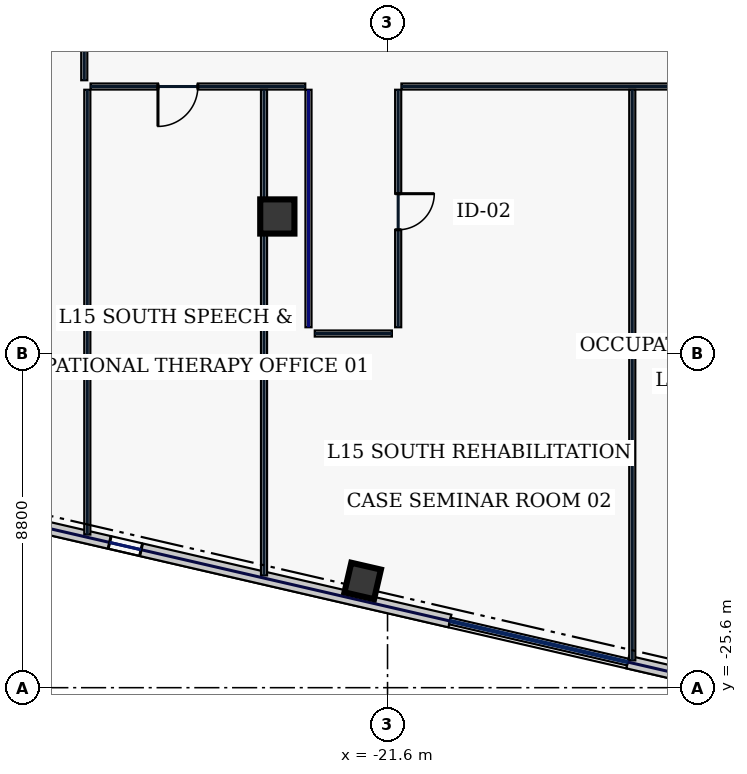
"""IFC4 building model, lengths in metres.
Left out: names, types, materials, properties, quantities, classifications, styles, units other than length and angle.
Written with IfcOpenShell. Run it as: python <this file> out.ifc"""

import sys

from ifc_helpers import new_model, si_unit, direction, frame, frame_2d, origin, origin_2d, place, context, subcontext, project, spatial, rectangle, hollow_rectangle, extrude, element, fill, save


model = new_model("IFC4")
c1 = context("Model", 3, precision=1e-05, world=origin(), true_north=direction((0.0, 1.0)))
c2 = subcontext(c1, "Body", "Model", "MODEL_VIEW")
j1 = project(units=[si_unit("LENGTHUNIT", "METRE"), si_unit("PLANEANGLEUNIT", "RADIAN")], contexts=[c1])
p1 = place(None, origin())
s1 = spatial("IfcSite", under=j1, at=p1, CompositionType="ELEMENT")
p2 = place(p1, origin())
s2 = spatial("IfcBuilding", under=s1, at=p2, CompositionType="ELEMENT")
p3 = place(p2, frame((0.0, 0.0, 71.4)))
s3 = spatial("IfcBuildingStorey", under=s2, at=p3, CompositionType="ELEMENT", Elevation=71.4)
p4 = place(p3, frame((-24.5, -13.2, 0.0), z_axis=(0.0, 0.0, 1.0), x_axis=(1.0, 0.0, 0.0)))
e1 = element("IfcColumn", 1, at=p4, inside=s3, PredefinedType="COLUMN", context=c2, shape_type="SweptSolid", body=[
    extrude(hollow_rectangle(XDim=0.9, YDim=0.9, WallThickness=0.04, at=origin_2d()), origin(), (0.0, 0.0, 1.0), 3.74),
])
p5 = place(p3, frame((-22.254, -22.792, 0.0), z_axis=(0.0, 0.0, 1.0), x_axis=(0.974370064785, -0.224951054344, 0.0)))
e2 = element("IfcColumn", 2, at=p5, inside=s3, PredefinedType="COLUMN", context=c2, shape_type="SweptSolid", body=[
    extrude(hollow_rectangle(XDim=0.8, YDim=0.8, WallThickness=0.036, at=origin_2d()), origin(), (0.0, 0.0, 1.0), 3.74),
])
p6 = place(p3, frame((-42.029, -18.75, 0.0), z_axis=(0.0, 0.0, 1.0), x_axis=(0.97436993772, -0.224951604723, 0.0)))
e3 = element("IfcWall", 3, at=p6, inside=s3, PredefinedType="STANDARD", context=c2, shape_type="SweptSolid", body=[
    extrude(rectangle(XDim=22.651, YDim=0.34, at=frame_2d((11.326, 0.0))), origin(), (0.0, 0.0, 1.0), 3.74),
])
p7 = place(p6, frame((2.062, 0.0, 0.72)))
e4 = element("IfcOpeningElement", 4, at=p7, cuts=e3, PredefinedType="OPENING", context=c2, shape_type="SweptSolid", body=[
    extrude(rectangle(XDim=2.5, YDim=2.15, at=frame_2d((1.25, 1.075))), frame((0.0, 0.18, 0.0), z_axis=(0.0, -1.0, 0.0), x_axis=(1.0, 0.0, 0.0)), (0.0, 0.0, 1.0), 0.36),
])
p8 = place(p6, frame((6.546, 0.0, 0.72)))
e5 = element("IfcOpeningElement", 5, at=p8, cuts=e3, PredefinedType="OPENING", context=c2, shape_type="SweptSolid", body=[
    extrude(rectangle(XDim=2.5, YDim=2.15, at=frame_2d((1.25, 1.075))), frame((0.0, 0.18, 0.0), z_axis=(0.0, -1.0, 0.0), x_axis=(1.0, 0.0, 0.0)), (0.0, 0.0, 1.0), 0.36),
])
p9 = place(p6, frame((13.461, 0.0, 0.72)))
e6 = element("IfcOpeningElement", 6, at=p9, cuts=e3, PredefinedType="OPENING", context=c2, shape_type="SweptSolid", body=[
    extrude(rectangle(XDim=0.85, YDim=1.85, at=frame_2d((0.425, 0.925))), frame((0.0, 0.18, 0.0), z_axis=(0.0, -1.0, 0.0), x_axis=(1.0, 0.0, 0.0)), (0.0, 0.0, 1.0), 0.36),
])
p10 = place(p3, frame((-15.281, -24.925, 0.0), z_axis=(0.0, 0.0, 1.0), x_axis=(0.974370193991, -0.22495049469, 0.0)))
e7 = element("IfcWall", 7, at=p10, inside=s3, PredefinedType="STANDARD", context=c2, shape_type="SweptSolid", body=[
    extrude(rectangle(XDim=14.697, YDim=0.34, at=frame_2d((7.349, 0.0))), origin(), (0.0, 0.0, 1.0), 3.74),
])
p11 = place(p10, frame((3.856, 0.0, 0.72)))
e8 = element("IfcOpeningElement", 8, at=p11, cuts=e7, PredefinedType="OPENING", context=c2, shape_type="SweptSolid", body=[
    extrude(rectangle(XDim=2.5, YDim=2.15, at=frame_2d((1.25, 1.075))), frame((0.0, 0.18, 0.0), z_axis=(0.0, -1.0, 0.0), x_axis=(1.0, 0.0, 0.0)), (0.0, 0.0, 1.0), 0.36),
])
p12 = place(p10, frame((8.341, 0.0, 0.72)))
e9 = element("IfcOpeningElement", 9, at=p12, cuts=e7, PredefinedType="OPENING", context=c2, shape_type="SweptSolid", body=[
    extrude(rectangle(XDim=2.5, YDim=2.15, at=frame_2d((1.25, 1.075))), frame((0.0, 0.18, 0.0), z_axis=(0.0, -1.0, 0.0), x_axis=(1.0, 0.0, 0.0)), (0.0, 0.0, 1.0), 0.36),
])
p13 = place(p3, frame((-23.765, -9.78, 0.0), z_axis=(0.0, 0.0, 1.0), x_axis=(-1.0, 0.0, 0.0)))
e10 = element("IfcWall", 10, at=p13, inside=s3, PredefinedType="PARTITIONING", context=c2, shape_type="SweptSolid", body=[
    extrude(rectangle(XDim=5.65, YDim=0.16, at=frame_2d((2.825, 0.0))), origin(), (0.0, 0.0, 1.0), 3.74),
])
p14 = place(p13, frame((2.826, 0.0, 0.0)))
e11 = element("IfcOpeningElement", 11, at=p14, cuts=e10, PredefinedType="OPENING", context=c2, shape_type="SweptSolid", body=[
    extrude(rectangle(XDim=1.05, YDim=2.2, at=frame_2d((0.525, 1.1))), frame((0.0, 0.09, 0.0), z_axis=(0.0, -1.0, 0.0), x_axis=(1.0, 0.0, 0.0)), (0.0, 0.0, 1.0), 0.18),
])
p15 = place(p3, frame((-29.58, -9.615, 0.0), z_axis=(0.0, 0.0, 1.0), x_axis=(0.0, 1.0, 0.0)))
e12 = element("IfcWall", 12, at=p15, inside=s3, PredefinedType="PARTITIONING", context=c2, shape_type="SweptSolid", body=[
    extrude(rectangle(XDim=19.28, YDim=0.16, at=frame_2d((9.64, 0.0))), origin(), (0.0, 0.0, 1.0), 3.74),
])
p16 = place(p15, frame((1.969, 0.0, 0.0)))
e13 = element("IfcOpeningElement", 13, at=p16, cuts=e12, PredefinedType="OPENING", context=c2, shape_type="SweptSolid", body=[
    extrude(rectangle(XDim=0.95, YDim=2.2, at=frame_2d((0.475, 1.1))), frame((0.0, 0.09, 0.0), z_axis=(0.0, -1.0, 0.0), x_axis=(1.0, 0.0, 0.0)), (0.0, 0.0, 1.0), 0.18),
])
p17 = place(p15, frame((7.25, 0.0, 0.0)))
e14 = element("IfcOpeningElement", 14, at=p17, cuts=e12, PredefinedType="OPENING", context=c2, shape_type="SweptSolid", body=[
    extrude(rectangle(XDim=0.95, YDim=2.2, at=frame_2d((0.475, 1.1))), frame((0.0, 0.09, 0.0), z_axis=(0.0, -1.0, 0.0), x_axis=(1.0, 0.0, 0.0)), (0.0, 0.0, 1.0), 0.18),
])
p18 = place(p15, frame((12.45, 0.0, 0.0)))
e15 = element("IfcOpeningElement", 15, at=p18, cuts=e12, PredefinedType="OPENING", context=c2, shape_type="SweptSolid", body=[
    extrude(rectangle(XDim=0.95, YDim=2.2, at=frame_2d((0.475, 1.1))), frame((0.0, 0.09, 0.0), z_axis=(0.0, -1.0, 0.0), x_axis=(1.0, 0.0, 0.0)), (0.0, 0.0, 1.0), 0.18),
])
p19 = place(p15, frame((16.506, 0.0, 0.0)))
e16 = element("IfcOpeningElement", 16, at=p19, cuts=e12, PredefinedType="OPENING", context=c2, shape_type="SweptSolid", body=[
    extrude(rectangle(XDim=0.95, YDim=2.2, at=frame_2d((0.475, 1.1))), frame((0.0, 0.09, 0.0), z_axis=(0.0, -1.0, 0.0), x_axis=(1.0, 0.0, 0.0)), (0.0, 0.0, 1.0), 0.18),
])
p20 = place(p3, frame((29.415, -9.78, 0.0), z_axis=(0.0, 0.0, 1.0), x_axis=(-1.0, 0.0, 0.0)))
e17 = element("IfcWall", 17, at=p20, inside=s3, PredefinedType="PARTITIONING", context=c2, shape_type="SweptSolid", body=[
    extrude(rectangle(XDim=50.65, YDim=0.16, at=frame_2d((25.325, 0.0))), origin(), (0.0, 0.0, 1.0), 3.74),
])
p21 = place(p20, frame((40.5, 0.0, 0.0)))
e18 = element("IfcOpeningElement", 18, at=p21, cuts=e17, PredefinedType="OPENING", context=c2, shape_type="SweptSolid", body=[
    extrude(rectangle(XDim=0.95, YDim=2.2, at=frame_2d((0.475, 1.1))), frame((0.0, 0.09, 0.0), z_axis=(0.0, -1.0, 0.0), x_axis=(1.0, 0.0, 0.0)), (0.0, 0.0, 1.0), 0.18),
])
p22 = place(p20, frame((33.52, 0.0, 0.0)))
e19 = element("IfcOpeningElement", 19, at=p22, cuts=e17, PredefinedType="OPENING", context=c2, shape_type="SweptSolid", body=[
    extrude(rectangle(XDim=0.95, YDim=2.2, at=frame_2d((0.475, 1.1))), frame((0.0, 0.09, 0.0), z_axis=(0.0, -1.0, 0.0), x_axis=(1.0, 0.0, 0.0)), (0.0, 0.0, 1.0), 0.18),
])
p23 = place(p20, frame((26.525, 0.0, 0.0)))
e20 = element("IfcOpeningElement", 20, at=p23, cuts=e17, PredefinedType="OPENING", context=c2, shape_type="SweptSolid", body=[
    extrude(rectangle(XDim=0.95, YDim=2.2, at=frame_2d((0.475, 1.1))), frame((0.0, 0.09, 0.0), z_axis=(0.0, -1.0, 0.0), x_axis=(1.0, 0.0, 0.0)), (0.0, 0.0, 1.0), 0.18),
])
p24 = place(p20, frame((20.75, 0.0, 0.0)))
e21 = element("IfcOpeningElement", 21, at=p24, cuts=e17, PredefinedType="OPENING", context=c2, shape_type="SweptSolid", body=[
    extrude(rectangle(XDim=1.05, YDim=2.2, at=frame_2d((0.525, 1.1))), frame((0.0, 0.09, 0.0), z_axis=(0.0, -1.0, 0.0), x_axis=(1.0, 0.0, 0.0)), (0.0, 0.0, 1.0), 0.18),
])
p25 = place(p20, frame((17.05, 0.0, 0.0)))
e22 = element("IfcOpeningElement", 22, at=p25, cuts=e17, PredefinedType="OPENING", context=c2, shape_type="SweptSolid", body=[
    extrude(rectangle(XDim=0.95, YDim=2.2, at=frame_2d((0.475, 1.1))), frame((0.0, 0.09, 0.0), z_axis=(0.0, -1.0, 0.0), x_axis=(1.0, 0.0, 0.0)), (0.0, 0.0, 1.0), 0.18),
])
p26 = place(p20, frame((13.35, 0.0, 0.0)))
e23 = element("IfcOpeningElement", 23, at=p26, cuts=e17, PredefinedType="OPENING", context=c2, shape_type="SweptSolid", body=[
    extrude(rectangle(XDim=1.15, YDim=2.2, at=frame_2d((0.575, 1.1))), frame((0.0, 0.09, 0.0), z_axis=(0.0, -1.0, 0.0), x_axis=(1.0, 0.0, 0.0)), (0.0, 0.0, 1.0), 0.18),
])
p27 = place(p20, frame((9.65, 0.0, 0.0)))
e24 = element("IfcOpeningElement", 24, at=p27, cuts=e17, PredefinedType="OPENING", context=c2, shape_type="SweptSolid", body=[
    extrude(rectangle(XDim=0.95, YDim=2.2, at=frame_2d((0.475, 1.1))), frame((0.0, 0.09, 0.0), z_axis=(0.0, -1.0, 0.0), x_axis=(1.0, 0.0, 0.0)), (0.0, 0.0, 1.0), 0.18),
])
p28 = place(p20, frame((6.1, 0.0, 0.0)))
e25 = element("IfcOpeningElement", 25, at=p28, cuts=e17, PredefinedType="OPENING", context=c2, shape_type="SweptSolid", body=[
    extrude(rectangle(XDim=0.95, YDim=2.2, at=frame_2d((0.475, 1.1))), frame((0.0, 0.09, 0.0), z_axis=(0.0, -1.0, 0.0), x_axis=(1.0, 0.0, 0.0)), (0.0, 0.0, 1.0), 0.18),
])
p29 = place(p20, frame((2.044, 0.0, 0.0)))
e26 = element("IfcOpeningElement", 26, at=p29, cuts=e17, PredefinedType="OPENING", context=c2, shape_type="SweptSolid", body=[
    extrude(rectangle(XDim=1.05, YDim=2.2, at=frame_2d((0.525, 1.1))), frame((0.0, 0.09, 0.0), z_axis=(0.0, -1.0, 0.0), x_axis=(1.0, 0.0, 0.0)), (0.0, 0.0, 1.0), 0.18),
])
p30 = place(p3, frame((-21.32, -9.865, 0.0), z_axis=(0.0, 0.0, 1.0), x_axis=(0.0, -1.0, 0.0)))
e27 = element("IfcWall", 27, at=p30, inside=s3, PredefinedType="PARTITIONING", context=c2, shape_type="SweptSolid", body=[
    extrude(rectangle(XDim=6.25, YDim=0.16, at=frame_2d((3.125, 0.0))), origin(), (0.0, 0.0, 1.0), 3.74),
])
p31 = place(p30, frame((2.735, 0.0, 0.0)))
e28 = element("IfcOpeningElement", 28, at=p31, cuts=e27, PredefinedType="OPENING", context=c2, shape_type="SweptSolid", body=[
    extrude(rectangle(XDim=0.95, YDim=2.2, at=frame_2d((0.475, 1.1))), frame((0.0, 0.09, 0.0), z_axis=(0.0, -1.0, 0.0), x_axis=(1.0, 0.0, 0.0)), (0.0, 0.0, 1.0), 0.18),
])
p32 = place(p3, frame((-21.485, -16.28, 0.0), z_axis=(0.0, 0.0, 1.0), x_axis=(-1.0, 0.0, 0.0)))
e29 = element("IfcWall", 29, at=p32, inside=s3, PredefinedType="PARTITIONING", context=c2, shape_type="SweptSolid", body=[
    extrude(rectangle(XDim=2.03, YDim=0.16, at=frame_2d((1.015, 0.0))), origin(), (0.0, 0.0, 1.0), 3.74),
])
p33 = place(p3, frame((-23.68, -16.115, 0.0), z_axis=(0.0, 0.0, 1.0), x_axis=(0.0, 1.0, 0.0)))
e30 = element("IfcWall", 30, at=p33, inside=s3, PredefinedType="PARTITIONING", context=c2, shape_type="SweptSolid", body=[
    extrude(rectangle(XDim=6.25, YDim=0.16, at=frame_2d((3.125, 0.0))), origin(), (0.0, 0.0, 1.0), 3.235),
])
p34 = place(p3, frame((-29.5, -21.571, 0.0), z_axis=(0.0, 0.0, 1.0), x_axis=(0.0, 1.0, 0.0)))
e31 = element("IfcWall", 31, at=p34, inside=s3, PredefinedType="PARTITIONING", context=c2, shape_type="SweptSolid", body=[
    extrude(rectangle(XDim=11.706, YDim=0.16, at=frame_2d((5.853, 0.0))), origin(), (0.0, 0.0, 1.0), 3.74),
])
p35 = place(p3, frame((-24.85, -22.644, 0.0), z_axis=(0.0, 0.0, 1.0), x_axis=(0.0, 1.0, 0.0)))
e32 = element("IfcWall", 32, at=p35, inside=s3, PredefinedType="PARTITIONING", context=c2, shape_type="SweptSolid", body=[
    extrude(rectangle(XDim=12.779, YDim=0.16, at=frame_2d((6.39, 0.0))), origin(), (0.0, 0.0, 1.0), 3.74),
])
p36 = place(p3, frame((-15.16, -24.881, 0.0), z_axis=(0.0, 0.0, 1.0), x_axis=(0.0, 1.0, 0.0)))
e33 = element("IfcWall", 33, at=p36, inside=s3, PredefinedType="PARTITIONING", context=c2, shape_type="SweptSolid", body=[
    extrude(rectangle(XDim=15.016, YDim=0.16, at=frame_2d((7.508, 0.0))), origin(), (0.0, 0.0, 1.0), 3.74),
])
p37 = place(p9, origin())
e34 = element("IfcWindow", 34, at=p37, inside=s3, PartitioningType="SINGLE_PANEL", PredefinedType="WINDOW", context=c2, shape_type="SweptSolid", body=[
    extrude(rectangle(XDim=0.85, YDim=1.85, at=frame_2d((0.425, 0.925))), frame((0.0, 0.03, 0.0), z_axis=(0.0, -1.0, 0.0), x_axis=(1.0, 0.0, 0.0)), (0.0, 0.0, 1.0), 0.06),
])
fill(e6, e34)
p38 = place(p14, origin())
e35 = element("IfcDoor", 35, at=p38, inside=s3, OperationType="SINGLE_SWING_RIGHT", PredefinedType="DOOR", context=c2, shape_type="SweptSolid", body=[
    extrude(rectangle(XDim=1.05, YDim=2.2, at=frame_2d((0.525, 1.1))), frame((0.0, 0.025, 0.0), z_axis=(0.0, -1.0, 0.0), x_axis=(1.0, 0.0, 0.0)), (0.0, 0.0, 1.0), 0.05),
])
fill(e11, e35)
p39 = place(p31, origin())
e36 = element("IfcDoor", 36, at=p39, inside=s3, OperationType="SINGLE_SWING_LEFT", PredefinedType="DOOR", context=c2, shape_type="SweptSolid", body=[
    extrude(rectangle(XDim=0.95, YDim=2.2, at=frame_2d((0.475, 1.1))), frame((0.0, 0.025, 0.0), z_axis=(0.0, -1.0, 0.0), x_axis=(1.0, 0.0, 0.0)), (0.0, 0.0, 1.0), 0.05),
])
fill(e28, e36)
save(model, sys.argv[1])
